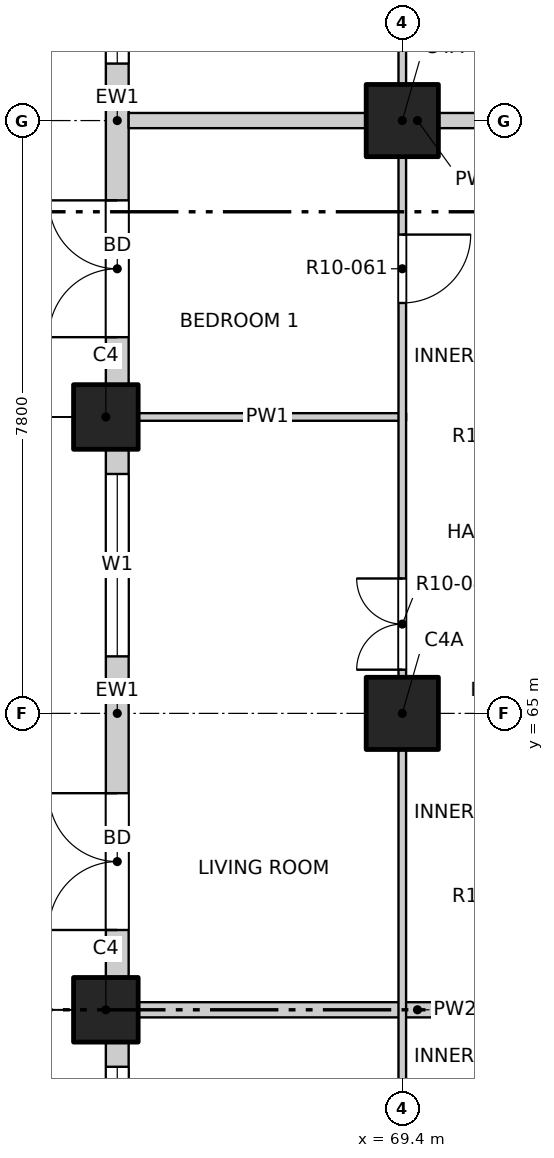
"""IFC4 building model, lengths in metres.
Left out: names, types, materials, properties, quantities, classifications, styles, units other than length and angle.
Written with IfcOpenShell. Run it as: python <this file> out.ifc"""

import sys

from ifc_helpers import new_model, si_unit, direction, frame, frame_2d, origin, origin_2d, place, context, subcontext, project, spatial, rectangle, extrude, element, fill, save


model = new_model("IFC4")
c1 = context("Model", 3, precision=1e-05, world=origin(), true_north=direction((0.0, 1.0)))
c2 = subcontext(c1, "Body", "Model", "MODEL_VIEW")
j1 = project(units=[si_unit("LENGTHUNIT", "METRE"), si_unit("PLANEANGLEUNIT", "RADIAN")], contexts=[c1])
p1 = place(None, origin())
s1 = spatial("IfcSite", under=j1, at=p1, CompositionType="ELEMENT")
p2 = place(p1, origin())
s2 = spatial("IfcBuilding", under=s1, at=p2, CompositionType="ELEMENT")
p3 = place(p2, frame((0.0, 0.0, 123.7)))
s3 = spatial("IfcBuildingStorey", under=s2, at=p3, CompositionType="ELEMENT", Elevation=123.7)
for number, where, z_axis, x_axis in (
    (1, (65.5, 61.1, -0.3), (0.0, 0.0, 1.0), (1.0, 0.0, 0.0)),
    (2, (65.5, 68.9, -0.3), (0.0, 0.0, 1.0), (1.0, 0.0, 0.0)),
):
    element("IfcColumn", number, at=place(p3, frame(where, z_axis=z_axis, x_axis=x_axis)), inside=s3, PredefinedType="COLUMN", context=c2, shape_type="SweptSolid", body=[
        extrude(rectangle(XDim=0.85, YDim=0.85, at=origin_2d()), origin(), (0.0, 0.0, 1.0), 3.45),
    ])
for number, where, z_axis, x_axis in (
    (3, (69.4, 65.0, -0.3), (0.0, 0.0, 1.0), (1.0, 0.0, 0.0)),
    (4, (69.4, 72.8, -0.3), (0.0, 0.0, 1.0), (1.0, 0.0, 0.0)),
):
    element("IfcColumn", number, at=place(p3, frame(where, z_axis=z_axis, x_axis=x_axis)), inside=s3, PredefinedType="COLUMN", context=c2, shape_type="SweptSolid", body=[
        extrude(rectangle(XDim=0.95, YDim=0.95, at=origin_2d()), origin(), (0.0, 0.0, 1.0), 3.45),
    ])
p4 = place(p3, frame((65.65, 53.725, 0.0), z_axis=(0.0, 0.0, 1.0), x_axis=(0.0, 1.0, 0.0)))
e5 = element("IfcWall", 5, at=p4, inside=s3, PredefinedType="SOLIDWALL", context=c2, shape_type="SweptSolid", body=[
    extrude(rectangle(XDim=6.95, YDim=0.3, at=frame_2d((3.475, 0.0))), origin(), (0.0, 0.0, 1.0), 2.7),
])
p5 = place(p4, frame((0.625, 0.0, 0.0)))
e6 = element("IfcOpeningElement", 6, at=p5, cuts=e5, PredefinedType="OPENING", context=c2, shape_type="SweptSolid", body=[
    extrude(rectangle(XDim=1.8, YDim=2.4, at=frame_2d((0.9, 1.2))), frame((0.0, 0.16, 0.0), z_axis=(0.0, -1.0, 0.0), x_axis=(1.0, 0.0, 0.0)), (0.0, 0.0, 1.0), 0.32),
])
p6 = place(p4, frame((4.225, 0.0, 0.9)))
e7 = element("IfcOpeningElement", 7, at=p6, cuts=e5, PredefinedType="OPENING", context=c2, shape_type="SweptSolid", body=[
    extrude(rectangle(XDim=2.4, YDim=1.8, at=frame_2d((1.2, 0.9))), frame((0.0, 0.16, 0.0), z_axis=(0.0, -1.0, 0.0), x_axis=(1.0, 0.0, 0.0)), (0.0, 0.0, 1.0), 0.32),
])
p7 = place(p3, frame((65.65, 61.525, 0.0), z_axis=(0.0, 0.0, 1.0), x_axis=(0.0, 1.0, 0.0)))
e8 = element("IfcWall", 8, at=p7, inside=s3, PredefinedType="SOLIDWALL", context=c2, shape_type="SweptSolid", body=[
    extrude(rectangle(XDim=6.95, YDim=0.3, at=frame_2d((3.475, 0.0))), origin(), (0.0, 0.0, 1.0), 2.7),
])
p8 = place(p7, frame((0.625, 0.0, 0.0)))
e9 = element("IfcOpeningElement", 9, at=p8, cuts=e8, PredefinedType="OPENING", context=c2, shape_type="SweptSolid", body=[
    extrude(rectangle(XDim=1.8, YDim=2.4, at=frame_2d((0.9, 1.2))), frame((0.0, 0.16, 0.0), z_axis=(0.0, -1.0, 0.0), x_axis=(1.0, 0.0, 0.0)), (0.0, 0.0, 1.0), 0.32),
])
p9 = place(p7, frame((4.225, 0.0, 0.9)))
e10 = element("IfcOpeningElement", 10, at=p9, cuts=e8, PredefinedType="OPENING", context=c2, shape_type="SweptSolid", body=[
    extrude(rectangle(XDim=2.4, YDim=1.8, at=frame_2d((1.2, 0.9))), frame((0.0, 0.16, 0.0), z_axis=(0.0, -1.0, 0.0), x_axis=(1.0, 0.0, 0.0)), (0.0, 0.0, 1.0), 0.32),
])
p10 = place(p3, frame((65.65, 69.325, 0.0), z_axis=(0.0, 0.0, 1.0), x_axis=(0.0, 1.0, 0.0)))
e11 = element("IfcWall", 11, at=p10, inside=s3, PredefinedType="SOLIDWALL", context=c2, shape_type="SweptSolid", body=[
    extrude(rectangle(XDim=6.95, YDim=0.3, at=frame_2d((3.475, 0.0))), origin(), (0.0, 0.0, 1.0), 2.7),
])
p11 = place(p10, frame((0.625, 0.0, 0.0)))
e12 = element("IfcOpeningElement", 12, at=p11, cuts=e11, PredefinedType="OPENING", context=c2, shape_type="SweptSolid", body=[
    extrude(rectangle(XDim=1.8, YDim=2.4, at=frame_2d((0.9, 1.2))), frame((0.0, 0.16, 0.0), z_axis=(0.0, -1.0, 0.0), x_axis=(1.0, 0.0, 0.0)), (0.0, 0.0, 1.0), 0.32),
])
p12 = place(p10, frame((4.225, 0.0, 0.9)))
e13 = element("IfcOpeningElement", 13, at=p12, cuts=e11, PredefinedType="OPENING", context=c2, shape_type="SweptSolid", body=[
    extrude(rectangle(XDim=2.4, YDim=1.8, at=frame_2d((1.2, 0.9))), frame((0.0, 0.16, 0.0), z_axis=(0.0, -1.0, 0.0), x_axis=(1.0, 0.0, 0.0)), (0.0, 0.0, 1.0), 0.32),
])
p13 = place(p3, frame((65.8, 61.1, 0.0), z_axis=(0.0, 0.0, 1.0), x_axis=(1.0, 0.0, 0.0)))
e14 = element("IfcWall", 14, at=p13, inside=s3, PredefinedType="PARTITIONING", context=c2, shape_type="SweptSolid", body=[
    extrude(rectangle(XDim=7.6, YDim=0.2, at=frame_2d((3.8, 0.0))), origin(), (0.0, 0.0, 1.0), 2.55),
])
p14 = place(p3, frame((65.8, 68.9, 0.0), z_axis=(0.0, 0.0, 1.0), x_axis=(1.0, 0.0, 0.0)))
e15 = element("IfcWall", 15, at=p14, inside=s3, PredefinedType="PARTITIONING", context=c2, shape_type="SweptSolid", body=[
    extrude(rectangle(XDim=3.65, YDim=0.1, at=frame_2d((1.825, 0.0))), origin(), (0.0, 0.0, 1.0), 2.55),
])
p15 = place(p3, frame((65.8, 72.8, 0.0), z_axis=(0.0, 0.0, 1.0), x_axis=(1.0, 0.0, 0.0)))
e16 = element("IfcWall", 16, at=p15, inside=s3, PredefinedType="PARTITIONING", context=c2, shape_type="SweptSolid", body=[
    extrude(rectangle(XDim=7.6, YDim=0.2, at=frame_2d((3.8, 0.0))), origin(), (0.0, 0.0, 1.0), 3.15),
])
p16 = place(p3, frame((69.4, 45.8, 0.0), z_axis=(0.0, 0.0, 1.0), x_axis=(0.0, 1.0, 0.0)))
e17 = element("IfcWall", 17, at=p16, inside=s3, PredefinedType="PARTITIONING", context=c2, shape_type="SweptSolid", body=[
    extrude(rectangle(XDim=38.4, YDim=0.1, at=frame_2d((19.2, 0.0))), origin(), (0.0, 0.0, 1.0), 3.15),
])
p17 = place(p16, frame((1.05, 0.0, 0.0)))
e18 = element("IfcOpeningElement", 18, at=p17, cuts=e17, PredefinedType="OPENING", context=c2, shape_type="SweptSolid", body=[
    extrude(rectangle(XDim=1.2, YDim=2.1, at=frame_2d((0.6, 1.05))), frame((0.0, 0.06, 0.0), z_axis=(0.0, -1.0, 0.0), x_axis=(1.0, 0.0, 0.0)), (0.0, 0.0, 1.0), 0.12),
])
p18 = place(p16, frame((5.1, 0.0, 0.0)))
e19 = element("IfcOpeningElement", 19, at=p18, cuts=e17, PredefinedType="OPENING", context=c2, shape_type="SweptSolid", body=[
    extrude(rectangle(XDim=0.9, YDim=2.1, at=frame_2d((0.45, 1.05))), frame((0.0, 0.06, 0.0), z_axis=(0.0, -1.0, 0.0), x_axis=(1.0, 0.0, 0.0)), (0.0, 0.0, 1.0), 0.12),
])
p19 = place(p16, frame((9.0, 0.0, 0.0)))
e20 = element("IfcOpeningElement", 20, at=p19, cuts=e17, PredefinedType="OPENING", context=c2, shape_type="SweptSolid", body=[
    extrude(rectangle(XDim=0.9, YDim=2.1, at=frame_2d((0.45, 1.05))), frame((0.0, 0.06, 0.0), z_axis=(0.0, -1.0, 0.0), x_axis=(1.0, 0.0, 0.0)), (0.0, 0.0, 1.0), 0.12),
])
p20 = place(p16, frame((12.9, 0.0, 0.0)))
e21 = element("IfcOpeningElement", 21, at=p20, cuts=e17, PredefinedType="OPENING", context=c2, shape_type="SweptSolid", body=[
    extrude(rectangle(XDim=0.9, YDim=2.1, at=frame_2d((0.45, 1.05))), frame((0.0, 0.06, 0.0), z_axis=(0.0, -1.0, 0.0), x_axis=(1.0, 0.0, 0.0)), (0.0, 0.0, 1.0), 0.12),
])
p21 = place(p16, frame((19.775, 0.0, 0.0)))
e22 = element("IfcOpeningElement", 22, at=p21, cuts=e17, PredefinedType="OPENING", context=c2, shape_type="SweptSolid", body=[
    extrude(rectangle(XDim=1.2, YDim=2.1, at=frame_2d((0.6, 1.05))), frame((0.0, 0.06, 0.0), z_axis=(0.0, -1.0, 0.0), x_axis=(1.0, 0.0, 0.0)), (0.0, 0.0, 1.0), 0.12),
])
p22 = place(p16, frame((24.6, 0.0, 0.0)))
e23 = element("IfcOpeningElement", 23, at=p22, cuts=e17, PredefinedType="OPENING", context=c2, shape_type="SweptSolid", body=[
    extrude(rectangle(XDim=0.9, YDim=2.1, at=frame_2d((0.45, 1.05))), frame((0.0, 0.06, 0.0), z_axis=(0.0, -1.0, 0.0), x_axis=(1.0, 0.0, 0.0)), (0.0, 0.0, 1.0), 0.12),
])
p23 = place(p16, frame((30.3, 0.0, 0.0)))
e24 = element("IfcOpeningElement", 24, at=p23, cuts=e17, PredefinedType="OPENING", context=c2, shape_type="SweptSolid", body=[
    extrude(rectangle(XDim=1.2, YDim=2.1, at=frame_2d((0.6, 1.05))), frame((0.0, 0.06, 0.0), z_axis=(0.0, -1.0, 0.0), x_axis=(1.0, 0.0, 0.0)), (0.0, 0.0, 1.0), 0.12),
])
p24 = place(p16, frame((36.15, 0.0, 0.0)))
e25 = element("IfcOpeningElement", 25, at=p24, cuts=e17, PredefinedType="OPENING", context=c2, shape_type="SweptSolid", body=[
    extrude(rectangle(XDim=1.2, YDim=2.1, at=frame_2d((0.6, 1.05))), frame((0.0, 0.06, 0.0), z_axis=(0.0, -1.0, 0.0), x_axis=(1.0, 0.0, 0.0)), (0.0, 0.0, 1.0), 0.12),
])
p25 = place(p6, origin())
e26 = element("IfcWindow", 26, at=p25, inside=s3, PartitioningType="DOUBLE_PANEL_VERTICAL", PredefinedType="WINDOW", context=c2, shape_type="SweptSolid", body=[
    extrude(rectangle(XDim=2.4, YDim=1.8, at=frame_2d((1.2, 0.9))), frame((0.0, 0.03, 0.0), z_axis=(0.0, -1.0, 0.0), x_axis=(1.0, 0.0, 0.0)), (0.0, 0.0, 1.0), 0.06),
])
fill(e7, e26)
p26 = place(p8, origin())
e27 = element("IfcDoor", 27, at=p26, inside=s3, OperationType="DOUBLE_DOOR_SINGLE_SWING", PredefinedType="DOOR", context=c2, shape_type="SweptSolid", body=[
    extrude(rectangle(XDim=1.8, YDim=2.4, at=frame_2d((0.9, 1.2))), frame((0.0, 0.025, 0.0), z_axis=(0.0, -1.0, 0.0), x_axis=(1.0, 0.0, 0.0)), (0.0, 0.0, 1.0), 0.05),
])
fill(e9, e27)
p27 = place(p9, origin())
e28 = element("IfcWindow", 28, at=p27, inside=s3, PartitioningType="DOUBLE_PANEL_VERTICAL", PredefinedType="WINDOW", context=c2, shape_type="SweptSolid", body=[
    extrude(rectangle(XDim=2.4, YDim=1.8, at=frame_2d((1.2, 0.9))), frame((0.0, 0.03, 0.0), z_axis=(0.0, -1.0, 0.0), x_axis=(1.0, 0.0, 0.0)), (0.0, 0.0, 1.0), 0.06),
])
fill(e10, e28)
p28 = place(p11, origin())
e29 = element("IfcDoor", 29, at=p28, inside=s3, OperationType="DOUBLE_DOOR_SINGLE_SWING", PredefinedType="DOOR", context=c2, shape_type="SweptSolid", body=[
    extrude(rectangle(XDim=1.8, YDim=2.4, at=frame_2d((0.9, 1.2))), frame((0.0, 0.025, 0.0), z_axis=(0.0, -1.0, 0.0), x_axis=(1.0, 0.0, 0.0)), (0.0, 0.0, 1.0), 0.05),
])
fill(e12, e29)
p29 = place(p12, origin())
e30 = element("IfcWindow", 30, at=p29, inside=s3, PartitioningType="DOUBLE_PANEL_VERTICAL", PredefinedType="WINDOW", context=c2, shape_type="SweptSolid", body=[
    extrude(rectangle(XDim=2.4, YDim=1.8, at=frame_2d((1.2, 0.9))), frame((0.0, 0.03, 0.0), z_axis=(0.0, -1.0, 0.0), x_axis=(1.0, 0.0, 0.0)), (0.0, 0.0, 1.0), 0.06),
])
fill(e13, e30)
p30 = place(p21, origin())
e31 = element("IfcDoor", 31, at=p30, inside=s3, OperationType="DOUBLE_DOOR_SINGLE_SWING", PredefinedType="DOOR", context=c2, shape_type="SweptSolid", body=[
    extrude(rectangle(XDim=1.2, YDim=2.1, at=frame_2d((0.6, 1.05))), frame((0.0, 0.025, 0.0), z_axis=(0.0, -1.0, 0.0), x_axis=(1.0, 0.0, 0.0)), (0.0, 0.0, 1.0), 0.05),
])
fill(e22, e31)
p31 = place(p22, origin())
e32 = element("IfcDoor", 32, at=p31, inside=s3, OperationType="SINGLE_SWING_LEFT", PredefinedType="DOOR", context=c2, shape_type="SweptSolid", body=[
    extrude(rectangle(XDim=0.9, YDim=2.1, at=frame_2d((0.45, 1.05))), frame((0.0, 0.025, 0.0), z_axis=(0.0, -1.0, 0.0), x_axis=(1.0, 0.0, 0.0)), (0.0, 0.0, 1.0), 0.05),
])
fill(e23, e32)
save(model, sys.argv[1])
